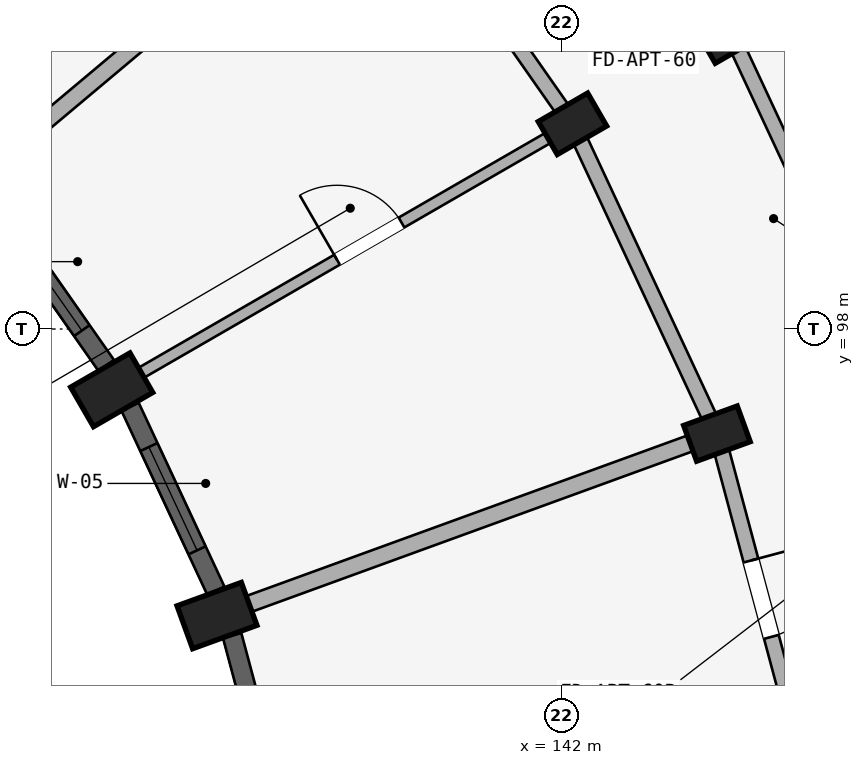
"""IFC4 building model, lengths in metres.
Left out: names, types, materials, properties, quantities, classifications, styles, units other than length and angle.
Written with IfcOpenShell. Run it as: python <this file> out.ifc"""

import sys

from ifc_helpers import new_model, si_unit, direction, frame, frame_2d, origin, origin_2d, place, context, subcontext, project, spatial, rectangle, extrude, element, fill, save


model = new_model("IFC4")
c1 = context("Model", 3, precision=1e-05, world=origin(), true_north=direction((0.0, 1.0)))
c2 = subcontext(c1, "Body", "Model", "MODEL_VIEW")
j1 = project(units=[si_unit("LENGTHUNIT", "METRE"), si_unit("PLANEANGLEUNIT", "RADIAN")], contexts=[c1])
p1 = place(None, origin())
s1 = spatial("IfcSite", under=j1, at=p1, CompositionType="ELEMENT")
p2 = place(p1, origin())
s2 = spatial("IfcBuilding", under=s1, at=p2, CompositionType="ELEMENT")
p3 = place(p2, frame((0.0, 0.0, 4.5)))
s3 = spatial("IfcBuildingStorey", under=s2, at=p3, CompositionType="ELEMENT", Elevation=4.5)
p4 = place(p3, frame((136.081, 97.2, 0.0), z_axis=(0.0, 0.0, 1.0), x_axis=(-0.5, 0.866025403784, 0.0)))
e1 = element("IfcColumn", 1, at=p4, inside=s3, PredefinedType="COLUMN", context=c2, shape_type="SweptSolid", body=[
    extrude(rectangle(XDim=0.6, YDim=0.9, at=origin_2d()), origin(), (0.0, 0.0, 1.0), 3.98),
])
for number, where, z_axis, x_axis in (
    (2, (142.144, 100.7, 0.0), (0.0, 0.0, 1.0), (-0.5, 0.866, 0.0)),
    (3, (144.222, 101.9, 0.0), (0.0, 0.0, 1.0), (-0.5, 0.866, 0.0)),
):
    element("IfcColumn", number, at=place(p3, frame(where, z_axis=z_axis, x_axis=x_axis)), inside=s3, PredefinedType="COLUMN", context=c2, shape_type="SweptSolid", body=[
        extrude(rectangle(XDim=0.5, YDim=0.75, at=origin_2d()), origin(), (0.0, 0.0, 1.0), 3.98),
    ])
p5 = place(p3, frame((137.466, 94.23, 0.0), z_axis=(0.0, 0.0, 1.0), x_axis=(-0.342020143326, 0.939692620786, 0.0)))
e4 = element("IfcColumn", 4, at=p5, inside=s3, PredefinedType="COLUMN", context=c2, shape_type="SweptSolid", body=[
    extrude(rectangle(XDim=0.6, YDim=0.9, at=origin_2d()), origin(), (0.0, 0.0, 1.0), 3.98),
])
p6 = place(p3, frame((144.044, 96.624, 0.0), z_axis=(0.0, 0.0, 1.0), x_axis=(-0.342020143326, 0.939692620786, 0.0)))
e5 = element("IfcColumn", 5, at=p6, inside=s3, PredefinedType="COLUMN", context=c2, shape_type="SweptSolid", body=[
    extrude(rectangle(XDim=0.5, YDim=0.75, at=origin_2d()), origin(), (0.0, 0.0, 1.0), 3.98),
])
p7 = place(p3, frame((139.564, 104.384, 0.0), z_axis=(0.0, 0.0, 1.0), x_axis=(0.573571637217, -0.819155404658, 0.0)))
e6 = element("IfcWall", 6, at=p7, inside=s3, PredefinedType="STANDARD", context=c2, shape_type="SweptSolid", body=[
    extrude(rectangle(XDim=4.497, YDim=0.2, at=frame_2d((2.249, 0.0))), origin(), (0.0, 0.0, 1.0), 3.322),
])
p8 = place(p7, frame((1.749, 0.0, 0.0)))
e7 = element("IfcOpeningElement", 7, at=p8, cuts=e6, PredefinedType="OPENING", context=c2, shape_type="SweptSolid", body=[
    extrude(rectangle(XDim=1.0, YDim=2.15, at=frame_2d((0.5, 1.075))), frame((0.0, 0.11, 0.0), z_axis=(0.0, -1.0, 0.0), x_axis=(1.0, 0.0, 0.0)), (0.0, 0.0, 1.0), 0.22),
])
p9 = place(p3, frame((142.144, 100.7, 0.0), z_axis=(0.0, 0.0, 1.0), x_axis=(0.422617978463, -0.906307919131, 0.0)))
e8 = element("IfcWall", 8, at=p9, inside=s3, PredefinedType="STANDARD", context=c2, shape_type="SweptSolid", body=[
    extrude(rectangle(XDim=4.497, YDim=0.2, at=frame_2d((2.249, 0.0))), origin(), (0.0, 0.0, 1.0), 3.322),
])
p10 = place(p3, frame((144.222, 101.9, 0.0), z_axis=(0.0, 0.0, 1.0), x_axis=(0.422629854778, -0.906302381024, 0.0)))
e9 = element("IfcWall", 9, at=p10, inside=s3, PredefinedType="STANDARD", context=c2, shape_type="SweptSolid", body=[
    extrude(rectangle(XDim=4.915, YDim=0.2, at=frame_2d((2.458, 0.0))), origin(), (0.0, 0.0, 1.0), 3.322),
])
p11 = place(p10, frame((1.918, 0.0, 0.0)))
e10 = element("IfcOpeningElement", 10, at=p11, cuts=e9, PredefinedType="OPENING", context=c2, shape_type="SweptSolid", body=[
    extrude(rectangle(XDim=1.08, YDim=2.15, at=frame_2d((0.54, 1.075))), frame((0.0, 0.11, 0.0), z_axis=(0.0, -1.0, 0.0), x_axis=(1.0, 0.0, 0.0)), (0.0, 0.0, 1.0), 0.22),
])
p12 = place(p3, frame((144.044, 96.624, 0.0), z_axis=(0.0, 0.0, 1.0), x_axis=(0.258787642463, -0.965934240054, 0.0)))
e11 = element("IfcWall", 11, at=p12, inside=s3, PredefinedType="STANDARD", context=c2, shape_type="SweptSolid", body=[
    extrude(rectangle(XDim=4.497, YDim=0.2, at=frame_2d((2.249, 0.0))), origin(), (0.0, 0.0, 1.0), 3.322),
])
p13 = place(p12, frame((1.729, 0.0, 0.0)))
e12 = element("IfcOpeningElement", 12, at=p13, cuts=e11, PredefinedType="OPENING", context=c2, shape_type="SweptSolid", body=[
    extrude(rectangle(XDim=1.04, YDim=2.15, at=frame_2d((0.52, 1.075))), frame((0.0, 0.11, 0.0), z_axis=(0.0, -1.0, 0.0), x_axis=(1.0, 0.0, 0.0)), (0.0, 0.0, 1.0), 0.22),
])
p14 = place(p3, frame((134.355, 100.013, 0.0), z_axis=(0.0, 0.0, 1.0), x_axis=(0.766046761698, 0.642784846501, 0.0)))
e13 = element("IfcWall", 13, at=p14, inside=s3, PredefinedType="STANDARD", context=c2, shape_type="SweptSolid", body=[
    extrude(rectangle(XDim=6.75, YDim=0.22, at=frame_2d((3.375, 0.0))), origin(), (0.0, 0.0, 1.0), 3.322),
])
p15 = place(p3, frame((136.254, 97.3, 0.0), z_axis=(0.0, 0.0, 1.0), x_axis=(0.866026575979, 0.499997969693, 0.0)))
e14 = element("IfcWall", 14, at=p15, inside=s3, PredefinedType="PARTITIONING", context=c2, shape_type="SweptSolid", body=[
    extrude(rectangle(XDim=6.75, YDim=0.15, at=frame_2d((3.375, 0.0))), origin(), (0.0, 0.0, 1.0), 3.322),
])
p16 = place(p15, frame((3.222, 0.0, 0.0)))
e15 = element("IfcOpeningElement", 15, at=p16, cuts=e14, PredefinedType="OPENING", context=c2, shape_type="SweptSolid", body=[
    extrude(rectangle(XDim=0.98, YDim=2.12, at=frame_2d((0.49, 1.06))), frame((0.0, 0.085, 0.0), z_axis=(0.0, -1.0, 0.0), x_axis=(1.0, 0.0, 0.0)), (0.0, 0.0, 1.0), 0.17),
])
p17 = place(p3, frame((137.654, 94.298, 0.0), z_axis=(0.0, 0.0, 1.0), x_axis=(0.939696231917, 0.342010221662, 0.0)))
e16 = element("IfcWall", 16, at=p17, inside=s3, PredefinedType="STANDARD", context=c2, shape_type="SweptSolid", body=[
    extrude(rectangle(XDim=6.75, YDim=0.22, at=frame_2d((3.375, 0.0))), origin(), (0.0, 0.0, 1.0), 3.322),
])
p18 = place(p3, frame((134.478, 99.707, 0.0), z_axis=(0.0, 0.0, 1.0), x_axis=(0.573591230309, -0.819141685249, 0.0)))
e17 = element("IfcWall", 17, at=p18, inside=s3, PredefinedType="STANDARD", context=c2, shape_type="SweptSolid", body=[
    extrude(rectangle(XDim=2.67, YDim=0.25, at=frame_2d((1.335, 0.0))), origin(), (0.0, 0.0, 1.0), 3.472),
])
p19 = place(p18, frame((0.56, 0.0, 0.88)))
e18 = element("IfcOpeningElement", 18, at=p19, cuts=e17, PredefinedType="OPENING", context=c2, shape_type="SweptSolid", body=[
    extrude(rectangle(XDim=1.55, YDim=1.6, at=frame_2d((0.775, 0.8))), frame((0.0, 0.135, 0.0), z_axis=(0.0, -1.0, 0.0), x_axis=(1.0, 0.0, 0.0)), (0.0, 0.0, 1.0), 0.27),
])
p20 = place(p3, frame((136.323, 96.978, 0.0), z_axis=(0.0, 0.0, 1.0), x_axis=(0.422610081738, -0.90631160139, 0.0)))
e19 = element("IfcWall", 19, at=p20, inside=s3, PredefinedType="STANDARD", context=c2, shape_type="SweptSolid", body=[
    extrude(rectangle(XDim=2.669, YDim=0.25, at=frame_2d((1.335, 0.0))), origin(), (0.0, 0.0, 1.0), 3.472),
])
p21 = place(p20, frame((0.585, 0.0, 0.88)))
e20 = element("IfcOpeningElement", 20, at=p21, cuts=e19, PredefinedType="OPENING", context=c2, shape_type="SweptSolid", body=[
    extrude(rectangle(XDim=1.5, YDim=1.65, at=frame_2d((0.75, 0.825))), frame((0.0, 0.135, 0.0), z_axis=(0.0, -1.0, 0.0), x_axis=(1.0, 0.0, 0.0)), (0.0, 0.0, 1.0), 0.27),
])
p22 = place(p3, frame((137.666, 93.969, 0.0), z_axis=(0.0, 0.0, 1.0), x_axis=(0.258812272661, -0.965927640934, 0.0)))
e21 = element("IfcWall", 21, at=p22, inside=s3, PredefinedType="STANDARD", context=c2, shape_type="SweptSolid", body=[
    extrude(rectangle(XDim=2.67, YDim=0.25, at=frame_2d((1.335, 0.0))), origin(), (0.0, 0.0, 1.0), 3.472),
])
p23 = place(p22, frame((0.735, 0.0, 0.88)))
e22 = element("IfcOpeningElement", 22, at=p23, cuts=e21, PredefinedType="OPENING", context=c2, shape_type="SweptSolid", body=[
    extrude(rectangle(XDim=1.2, YDim=1.5, at=frame_2d((0.6, 0.75))), frame((0.0, 0.135, 0.0), z_axis=(0.0, -1.0, 0.0), x_axis=(1.0, 0.0, 0.0)), (0.0, 0.0, 1.0), 0.27),
])
p24 = place(p19, origin())
e23 = element("IfcWindow", 23, at=p24, inside=s3, PartitioningType="DOUBLE_PANEL_VERTICAL", PredefinedType="WINDOW", context=c2, shape_type="SweptSolid", body=[
    extrude(rectangle(XDim=1.55, YDim=1.6, at=frame_2d((0.775, 0.8))), frame((0.0, 0.03, 0.0), z_axis=(0.0, -1.0, 0.0), x_axis=(1.0, 0.0, 0.0)), (0.0, 0.0, 1.0), 0.06),
])
fill(e18, e23)
p25 = place(p21, origin())
e24 = element("IfcWindow", 24, at=p25, inside=s3, PartitioningType="DOUBLE_PANEL_VERTICAL", PredefinedType="WINDOW", context=c2, shape_type="SweptSolid", body=[
    extrude(rectangle(XDim=1.5, YDim=1.65, at=frame_2d((0.75, 0.825))), frame((0.0, 0.03, 0.0), z_axis=(0.0, -1.0, 0.0), x_axis=(1.0, 0.0, 0.0)), (0.0, 0.0, 1.0), 0.06),
])
fill(e20, e24)
p26 = place(p16, frame((0.98, 0.0, 0.0), z_axis=(0.0, 0.0, 1.0), x_axis=(-1.0, 0.0, 0.0)))
e25 = element("IfcDoor", 25, at=p26, inside=s3, OperationType="SINGLE_SWING_RIGHT", PredefinedType="DOOR", context=c2, shape_type="SweptSolid", body=[
    extrude(rectangle(XDim=0.98, YDim=2.12, at=frame_2d((0.49, 1.06))), frame((0.0, 0.025, 0.0), z_axis=(0.0, -1.0, 0.0), x_axis=(1.0, 0.0, 0.0)), (0.0, 0.0, 1.0), 0.05),
])
fill(e15, e25)
p27 = place(p13, frame((1.04, 0.0, 0.0), z_axis=(0.0, 0.0, 1.0), x_axis=(-1.0, 0.0, 0.0)))
e26 = element("IfcDoor", 26, at=p27, inside=s3, OperationType="SINGLE_SWING_RIGHT", PredefinedType="DOOR", context=c2, shape_type="SweptSolid", body=[
    extrude(rectangle(XDim=1.04, YDim=2.15, at=frame_2d((0.52, 1.075))), frame((0.0, 0.025, 0.0), z_axis=(0.0, -1.0, 0.0), x_axis=(1.0, 0.0, 0.0)), (0.0, 0.0, 1.0), 0.05),
])
fill(e12, e26)
save(model, sys.argv[1])
